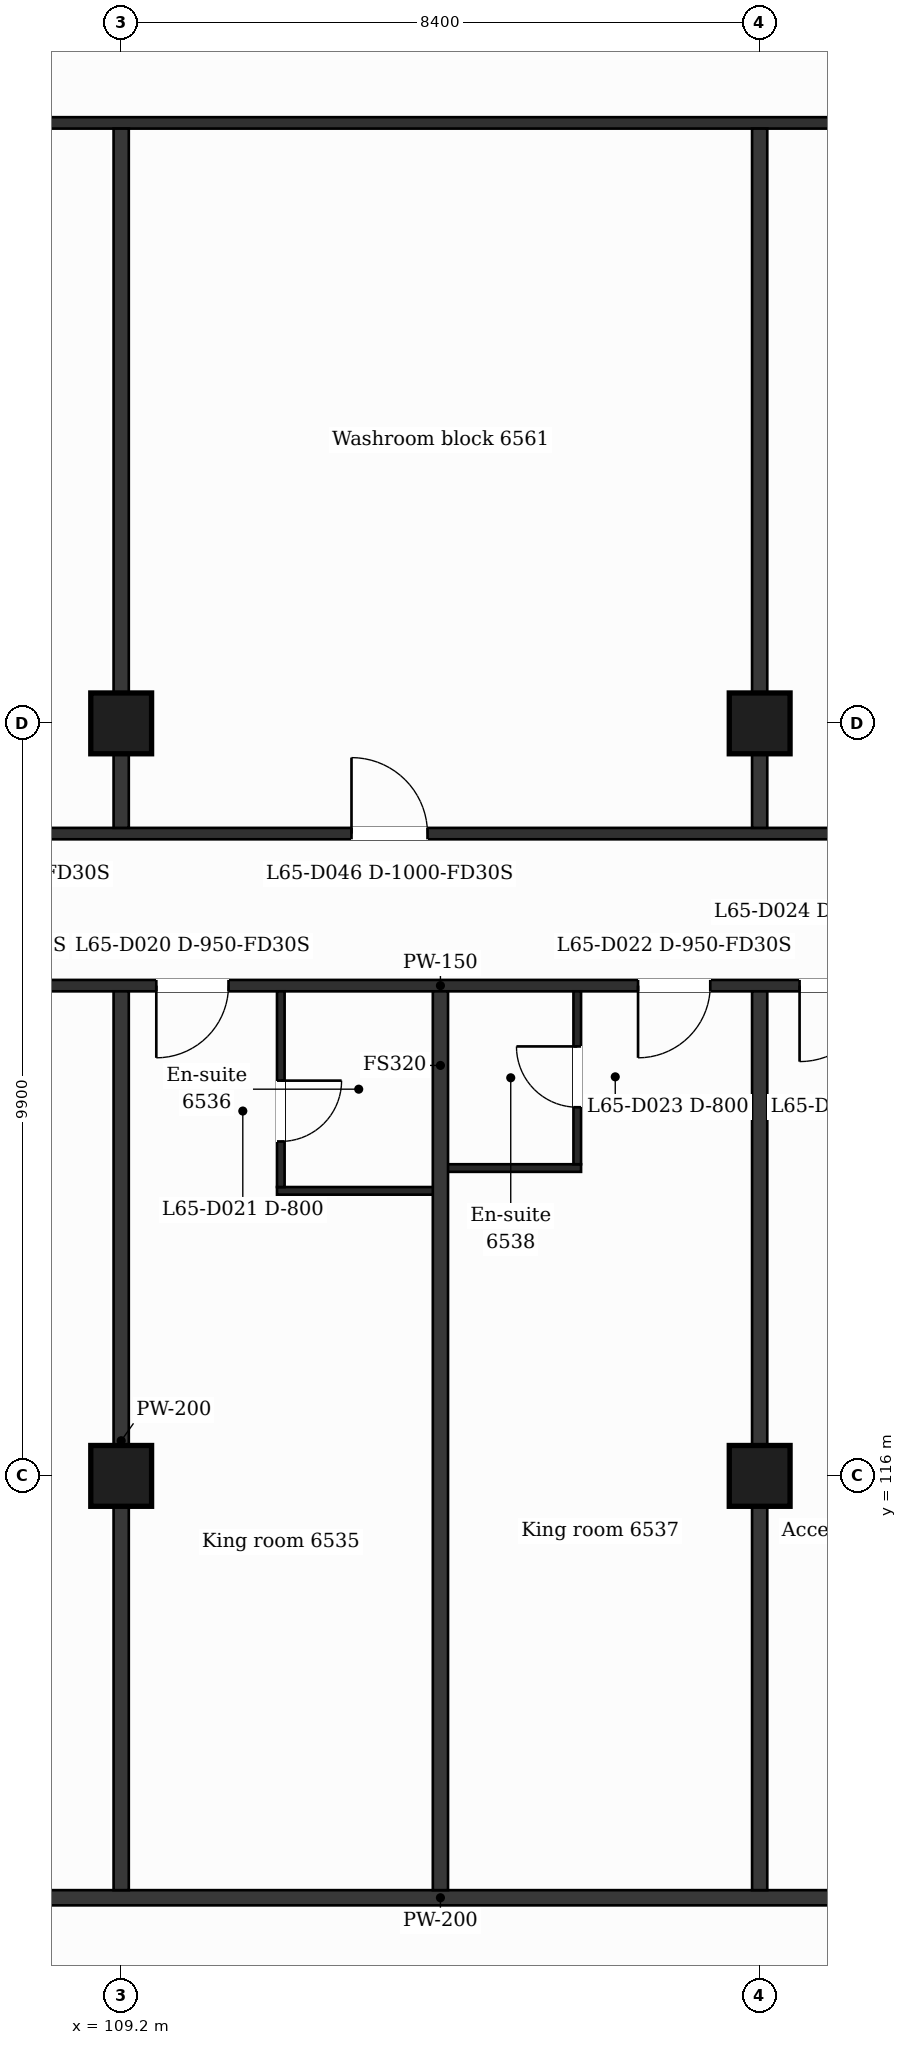
"""IFC4 building model, lengths in metres.
Left out: names, types, materials, properties, quantities, classifications, styles, units other than length and angle.
Written with IfcOpenShell. Run it as: python <this file> out.ifc"""

import sys

from ifc_helpers import new_model, si_unit, direction, frame, frame_2d, origin, origin_2d, place, context, subcontext, project, spatial, rectangle, extrude, element, fill, save


model = new_model("IFC4")
c1 = context("Model", 3, precision=1e-05, world=origin(), true_north=direction((0.0, 1.0)))
c2 = subcontext(c1, "Body", "Model", "MODEL_VIEW")
j1 = project(units=[si_unit("LENGTHUNIT", "METRE"), si_unit("PLANEANGLEUNIT", "RADIAN")], contexts=[c1])
p1 = place(None, origin())
s1 = spatial("IfcSite", under=j1, at=p1, CompositionType="ELEMENT")
p2 = place(p1, origin())
s2 = spatial("IfcBuilding", under=s1, at=p2, CompositionType="ELEMENT")
p3 = place(p2, frame((0.0, 0.0, 270.1)))
s3 = spatial("IfcBuildingStorey", under=s2, at=p3, CompositionType="ELEMENT", Elevation=270.1)
for number, where, z_axis, x_axis in (
    (1, (109.2, 116.0, 0.0), (0.0, 0.0, 1.0), (1.0, 0.0, 0.0)),
    (2, (117.6, 116.0, 0.0), (0.0, 0.0, 1.0), (1.0, 0.0, 0.0)),
    (3, (109.2, 125.9, 0.0), (0.0, 0.0, 1.0), (1.0, 0.0, 0.0)),
    (4, (117.6, 125.9, 0.0), (0.0, 0.0, 1.0), (1.0, 0.0, 0.0)),
):
    element("IfcColumn", number, at=place(p3, frame(where, z_axis=z_axis, x_axis=x_axis)), inside=s3, PredefinedType="COLUMN", context=c2, shape_type="SweptSolid", body=[
        extrude(rectangle(XDim=0.8, YDim=0.8, at=origin_2d()), origin(), (0.0, 0.0, 1.0), 3.7),
    ])
p4 = place(p3, frame((100.7, 110.45, 0.0), z_axis=(0.0, 0.0, 1.0), x_axis=(1.0, 0.0, 0.0)))
e5 = element("IfcWall", 5, at=p4, inside=s3, PredefinedType="PARTITIONING", context=c2, shape_type="SweptSolid", body=[
    extrude(rectangle(XDim=25.4, YDim=0.2, at=frame_2d((12.7, 0.0))), origin(), (0.0, 0.0, 1.0), 3.38),
])
p5 = place(p3, frame((111.25, 119.75, 0.0), z_axis=(0.0, 0.0, 1.0), x_axis=(1.0, 0.0, 0.0)))
e6 = element("IfcWall", 6, at=p5, inside=s3, PredefinedType="PARTITIONING", context=c2, shape_type="SweptSolid", body=[
    extrude(rectangle(XDim=2.15, YDim=0.1, at=frame_2d((1.075, 0.0))), origin(), (0.0, 0.0, 1.0), 3.38),
])
p6 = place(p3, frame((113.4, 120.05, 0.0), z_axis=(0.0, 0.0, 1.0), x_axis=(1.0, 0.0, 0.0)))
e7 = element("IfcWall", 7, at=p6, inside=s3, PredefinedType="PARTITIONING", context=c2, shape_type="SweptSolid", body=[
    extrude(rectangle(XDim=1.85, YDim=0.1, at=frame_2d((0.925, 0.0))), origin(), (0.0, 0.0, 1.0), 3.38),
])
p7 = place(p3, frame((100.8, 122.45, 0.0), z_axis=(0.0, 0.0, 1.0), x_axis=(1.0, 0.0, 0.0)))
e8 = element("IfcWall", 8, at=p7, inside=s3, PredefinedType="PARTITIONING", context=c2, shape_type="SweptSolid", body=[
    extrude(rectangle(XDim=25.2, YDim=0.15, at=frame_2d((12.6, 0.0))), origin(), (0.0, 0.0, 1.0), 3.38),
])
p8 = place(p7, frame((5.55, 0.0, 0.0)))
e9 = element("IfcOpeningElement", 9, at=p8, cuts=e8, PredefinedType="OPENING", context=c2, shape_type="SweptSolid", body=[
    extrude(rectangle(XDim=1.0, YDim=2.1, at=frame_2d((0.5, 1.05))), frame((0.0, 0.085, 0.0), z_axis=(0.0, -1.0, 0.0), x_axis=(1.0, 0.0, 0.0)), (0.0, 0.0, 1.0), 0.17),
])
p9 = place(p7, frame((8.862, 0.0, 0.0)))
e10 = element("IfcOpeningElement", 10, at=p9, cuts=e8, PredefinedType="OPENING", context=c2, shape_type="SweptSolid", body=[
    extrude(rectangle(XDim=0.95, YDim=2.1, at=frame_2d((0.475, 1.05))), frame((0.0, 0.085, 0.0), z_axis=(0.0, -1.0, 0.0), x_axis=(1.0, 0.0, 0.0)), (0.0, 0.0, 1.0), 0.17),
])
p10 = place(p7, frame((15.2, 0.0, 0.0)))
e11 = element("IfcOpeningElement", 11, at=p10, cuts=e8, PredefinedType="OPENING", context=c2, shape_type="SweptSolid", body=[
    extrude(rectangle(XDim=0.95, YDim=2.1, at=frame_2d((0.475, 1.05))), frame((0.0, 0.085, 0.0), z_axis=(0.0, -1.0, 0.0), x_axis=(1.0, 0.0, 0.0)), (0.0, 0.0, 1.0), 0.17),
])
p11 = place(p7, frame((17.325, 0.0, 0.0)))
e12 = element("IfcOpeningElement", 12, at=p11, cuts=e8, PredefinedType="OPENING", context=c2, shape_type="SweptSolid", body=[
    extrude(rectangle(XDim=1.0, YDim=2.1, at=frame_2d((0.5, 1.05))), frame((0.0, 0.085, 0.0), z_axis=(0.0, -1.0, 0.0), x_axis=(1.0, 0.0, 0.0)), (0.0, 0.0, 1.0), 0.17),
])
p12 = place(p7, frame((23.862, 0.0, 0.0)))
e13 = element("IfcOpeningElement", 13, at=p12, cuts=e8, PredefinedType="OPENING", context=c2, shape_type="SweptSolid", body=[
    extrude(rectangle(XDim=0.95, YDim=2.1, at=frame_2d((0.475, 1.05))), frame((0.0, 0.085, 0.0), z_axis=(0.0, -1.0, 0.0), x_axis=(1.0, 0.0, 0.0)), (0.0, 0.0, 1.0), 0.17),
])
p13 = place(p3, frame((100.8, 124.45, 0.0), z_axis=(0.0, 0.0, 1.0), x_axis=(1.0, 0.0, 0.0)))
e14 = element("IfcWall", 14, at=p13, inside=s3, PredefinedType="PARTITIONING", context=c2, shape_type="SweptSolid", body=[
    extrude(rectangle(XDim=25.2, YDim=0.15, at=frame_2d((12.6, 0.0))), origin(), (0.0, 0.0, 1.0), 3.38),
])
p14 = place(p13, frame((6.125, 0.0, 0.0)))
e15 = element("IfcOpeningElement", 15, at=p14, cuts=e14, PredefinedType="OPENING", context=c2, shape_type="SweptSolid", body=[
    extrude(rectangle(XDim=1.0, YDim=2.1, at=frame_2d((0.5, 1.05))), frame((0.0, 0.085, 0.0), z_axis=(0.0, -1.0, 0.0), x_axis=(1.0, 0.0, 0.0)), (0.0, 0.0, 1.0), 0.17),
])
p15 = place(p13, frame((1.325, 0.0, 0.0)))
e16 = element("IfcOpeningElement", 16, at=p15, cuts=e14, PredefinedType="OPENING", context=c2, shape_type="SweptSolid", body=[
    extrude(rectangle(XDim=1.0, YDim=2.1, at=frame_2d((0.5, 1.05))), frame((0.0, 0.085, 0.0), z_axis=(0.0, -1.0, 0.0), x_axis=(1.0, 0.0, 0.0)), (0.0, 0.0, 1.0), 0.17),
])
p16 = place(p13, frame((11.43, 0.0, 0.0)))
e17 = element("IfcOpeningElement", 17, at=p16, cuts=e14, PredefinedType="OPENING", context=c2, shape_type="SweptSolid", body=[
    extrude(rectangle(XDim=1.0, YDim=2.1, at=frame_2d((0.5, 1.05))), frame((0.0, 0.085, 0.0), z_axis=(0.0, -1.0, 0.0), x_axis=(1.0, 0.0, 0.0)), (0.0, 0.0, 1.0), 0.17),
])
p17 = place(p13, frame((21.17, 0.0, 0.0)))
e18 = element("IfcOpeningElement", 18, at=p17, cuts=e14, PredefinedType="OPENING", context=c2, shape_type="SweptSolid", body=[
    extrude(rectangle(XDim=1.0, YDim=2.1, at=frame_2d((0.5, 1.05))), frame((0.0, 0.085, 0.0), z_axis=(0.0, -1.0, 0.0), x_axis=(1.0, 0.0, 0.0)), (0.0, 0.0, 1.0), 0.17),
])
p18 = place(p3, frame((100.725, 133.8, 0.0), z_axis=(0.0, 0.0, 1.0), x_axis=(1.0, 0.0, 0.0)))
e19 = element("IfcWall", 19, at=p18, inside=s3, PredefinedType="PARTITIONING", context=c2, shape_type="SweptSolid", body=[
    extrude(rectangle(XDim=25.35, YDim=0.15, at=frame_2d((12.675, 0.0))), origin(), (0.0, 0.0, 1.0), 3.38),
])
p19 = place(p3, frame((109.2, 110.55, 0.0), z_axis=(0.0, 0.0, 1.0), x_axis=(0.0, 1.0, 0.0)))
e20 = element("IfcWall", 20, at=p19, inside=s3, PredefinedType="PARTITIONING", context=c2, shape_type="SweptSolid", body=[
    extrude(rectangle(XDim=11.825, YDim=0.2, at=frame_2d((5.913, 0.0))), origin(), (0.0, 0.0, 1.0), 3.38),
])
p20 = place(p3, frame((109.2, 124.525, 0.0), z_axis=(0.0, 0.0, 1.0), x_axis=(0.0, 1.0, 0.0)))
e21 = element("IfcWall", 21, at=p20, inside=s3, PredefinedType="PARTITIONING", context=c2, shape_type="SweptSolid", body=[
    extrude(rectangle(XDim=9.2, YDim=0.2, at=frame_2d((4.6, 0.0))), origin(), (0.0, 0.0, 1.0), 3.38),
])
p21 = place(p3, frame((111.3, 119.8, 0.0), z_axis=(0.0, 0.0, 1.0), x_axis=(0.0, 1.0, 0.0)))
e22 = element("IfcWall", 22, at=p21, inside=s3, PredefinedType="PARTITIONING", context=c2, shape_type="SweptSolid", body=[
    extrude(rectangle(XDim=2.575, YDim=0.1, at=frame_2d((1.288, 0.0))), origin(), (0.0, 0.0, 1.0), 3.38),
])
p22 = place(p21, frame((0.6, 0.0, 0.0)))
e23 = element("IfcOpeningElement", 23, at=p22, cuts=e22, PredefinedType="OPENING", context=c2, shape_type="SweptSolid", body=[
    extrude(rectangle(XDim=0.8, YDim=2.1, at=frame_2d((0.4, 1.05))), frame((0.0, 0.06, 0.0), z_axis=(0.0, -1.0, 0.0), x_axis=(1.0, 0.0, 0.0)), (0.0, 0.0, 1.0), 0.12),
])
p23 = place(p3, frame((113.4, 110.55, 0.0), z_axis=(0.0, 0.0, 1.0), x_axis=(0.0, 1.0, 0.0)))
e24 = element("IfcWall", 24, at=p23, inside=s3, PredefinedType="PARTITIONING", context=c2, shape_type="SweptSolid", body=[
    extrude(rectangle(XDim=11.825, YDim=0.2, at=frame_2d((5.913, 0.0))), origin(), (0.0, 0.0, 1.0), 3.38),
])
p24 = place(p3, frame((115.2, 120.1, 0.0), z_axis=(0.0, 0.0, 1.0), x_axis=(0.0, 1.0, 0.0)))
e25 = element("IfcWall", 25, at=p24, inside=s3, PredefinedType="PARTITIONING", context=c2, shape_type="SweptSolid", body=[
    extrude(rectangle(XDim=2.275, YDim=0.1, at=frame_2d((1.137, 0.0))), origin(), (0.0, 0.0, 1.0), 3.38),
])
p25 = place(p24, frame((0.75, 0.0, 0.0)))
e26 = element("IfcOpeningElement", 26, at=p25, cuts=e25, PredefinedType="OPENING", context=c2, shape_type="SweptSolid", body=[
    extrude(rectangle(XDim=0.8, YDim=2.1, at=frame_2d((0.4, 1.05))), frame((0.0, 0.06, 0.0), z_axis=(0.0, -1.0, 0.0), x_axis=(1.0, 0.0, 0.0)), (0.0, 0.0, 1.0), 0.12),
])
p26 = place(p3, frame((117.6, 110.55, 0.0), z_axis=(0.0, 0.0, 1.0), x_axis=(0.0, 1.0, 0.0)))
e27 = element("IfcWall", 27, at=p26, inside=s3, PredefinedType="PARTITIONING", context=c2, shape_type="SweptSolid", body=[
    extrude(rectangle(XDim=11.825, YDim=0.2, at=frame_2d((5.913, 0.0))), origin(), (0.0, 0.0, 1.0), 3.38),
])
p27 = place(p3, frame((117.6, 124.525, 0.0), z_axis=(0.0, 0.0, 1.0), x_axis=(0.0, 1.0, 0.0)))
e28 = element("IfcWall", 28, at=p27, inside=s3, PredefinedType="PARTITIONING", context=c2, shape_type="SweptSolid", body=[
    extrude(rectangle(XDim=9.2, YDim=0.2, at=frame_2d((4.6, 0.0))), origin(), (0.0, 0.0, 1.0), 3.38),
])
p28 = place(p9, origin())
e29 = element("IfcDoor", 29, at=p28, inside=s3, OperationType="SINGLE_SWING_LEFT", PredefinedType="DOOR", context=c2, shape_type="SweptSolid", body=[
    extrude(rectangle(XDim=0.95, YDim=2.1, at=frame_2d((0.475, 1.05))), frame((0.0, 0.025, 0.0), z_axis=(0.0, -1.0, 0.0), x_axis=(1.0, 0.0, 0.0)), (0.0, 0.0, 1.0), 0.05),
])
fill(e10, e29)
p29 = place(p22, origin())
e30 = element("IfcDoor", 30, at=p29, inside=s3, OperationType="SINGLE_SWING_RIGHT", PredefinedType="DOOR", context=c2, shape_type="SweptSolid", body=[
    extrude(rectangle(XDim=0.8, YDim=2.1, at=frame_2d((0.4, 1.05))), frame((0.0, 0.025, 0.0), z_axis=(0.0, -1.0, 0.0), x_axis=(1.0, 0.0, 0.0)), (0.0, 0.0, 1.0), 0.05),
])
fill(e23, e30)
p30 = place(p10, origin())
e31 = element("IfcDoor", 31, at=p30, inside=s3, OperationType="SINGLE_SWING_LEFT", PredefinedType="DOOR", context=c2, shape_type="SweptSolid", body=[
    extrude(rectangle(XDim=0.95, YDim=2.1, at=frame_2d((0.475, 1.05))), frame((0.0, 0.025, 0.0), z_axis=(0.0, -1.0, 0.0), x_axis=(1.0, 0.0, 0.0)), (0.0, 0.0, 1.0), 0.05),
])
fill(e11, e31)
p31 = place(p25, origin())
e32 = element("IfcDoor", 32, at=p31, inside=s3, OperationType="SINGLE_SWING_RIGHT", PredefinedType="DOOR", context=c2, shape_type="SweptSolid", body=[
    extrude(rectangle(XDim=0.8, YDim=2.1, at=frame_2d((0.4, 1.05))), frame((0.0, 0.025, 0.0), z_axis=(0.0, -1.0, 0.0), x_axis=(1.0, 0.0, 0.0)), (0.0, 0.0, 1.0), 0.05),
])
fill(e26, e32)
p32 = place(p11, origin())
e33 = element("IfcDoor", 33, at=p32, inside=s3, OperationType="SINGLE_SWING_LEFT", PredefinedType="DOOR", context=c2, shape_type="SweptSolid", body=[
    extrude(rectangle(XDim=1.0, YDim=2.1, at=frame_2d((0.5, 1.05))), frame((0.0, 0.025, 0.0), z_axis=(0.0, -1.0, 0.0), x_axis=(1.0, 0.0, 0.0)), (0.0, 0.0, 1.0), 0.05),
])
fill(e12, e33)
p33 = place(p16, origin())
e34 = element("IfcDoor", 34, at=p33, inside=s3, OperationType="SINGLE_SWING_LEFT", PredefinedType="DOOR", context=c2, shape_type="SweptSolid", body=[
    extrude(rectangle(XDim=1.0, YDim=2.1, at=frame_2d((0.5, 1.05))), frame((0.0, 0.025, 0.0), z_axis=(0.0, -1.0, 0.0), x_axis=(1.0, 0.0, 0.0)), (0.0, 0.0, 1.0), 0.05),
])
fill(e17, e34)
save(model, sys.argv[1])
